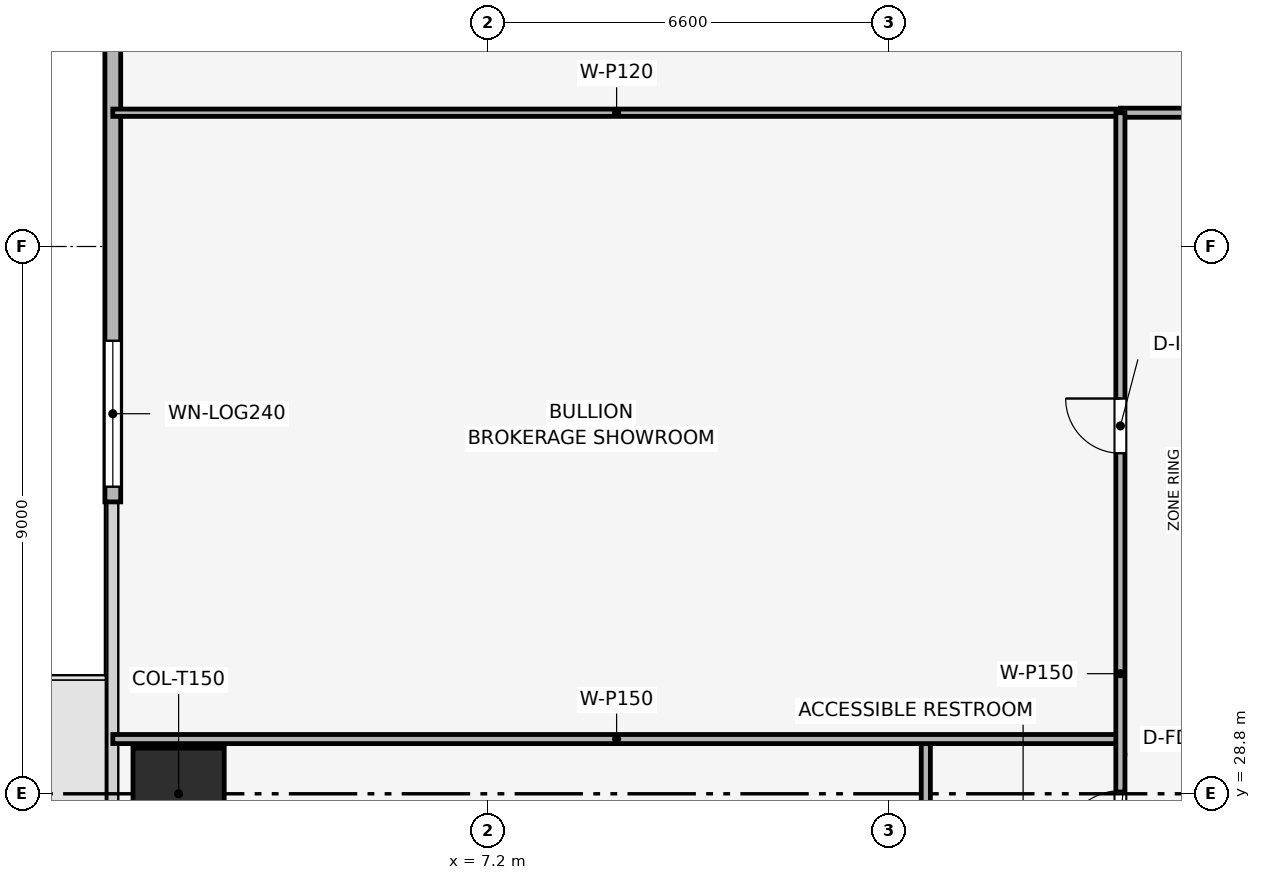
"""IFC4 building model, lengths in metres.
Left out: names, types, materials, properties, quantities, classifications, styles, units other than length and angle.
Written with IfcOpenShell. Run it as: python <this file> out.ifc"""

import sys

from ifc_helpers import new_model, si_unit, direction, frame, frame_2d, origin, origin_2d, place, context, subcontext, project, spatial, rectangle, extrude, element, fill, save


model = new_model("IFC4")
c1 = context("Model", 3, precision=1e-05, world=origin(), true_north=direction((0.0, 1.0)))
c2 = subcontext(c1, "Body", "Model", "MODEL_VIEW")
j1 = project(units=[si_unit("LENGTHUNIT", "METRE"), si_unit("PLANEANGLEUNIT", "RADIAN")], contexts=[c1])
p1 = place(None, origin())
s1 = spatial("IfcSite", under=j1, at=p1, CompositionType="ELEMENT")
p2 = place(p1, origin())
s2 = spatial("IfcBuilding", under=s1, at=p2, CompositionType="ELEMENT")
p3 = place(p2, frame((0.0, 0.0, 104.1)))
s3 = spatial("IfcBuildingStorey", under=s2, at=p3, CompositionType="ELEMENT", Elevation=104.1)
p4 = place(p3, frame((2.112, 28.8, 0.053), z_axis=(0.224854519766, 0.0, 0.974392346512), x_axis=(0.0, 1.0, 0.0)))
e1 = element("IfcColumn", 1, at=p4, inside=s3, PredefinedType="COLUMN", context=c2, shape_type="SweptSolid", body=[
    extrude(rectangle(XDim=1.5, YDim=1.5, at=origin_2d()), origin(), (0.0, 0.0, 1.0), 3.575),
])
p5 = place(p3, frame((1.03, 33.6, 0.0), z_axis=(0.0, 0.0, 1.0), x_axis=(0.0, 1.0, 0.0)))
e2 = element("IfcWall", 2, at=p5, inside=s3, PredefinedType="SOLIDWALL", context=c2, shape_type="SweptSolid", body=[
    extrude(rectangle(XDim=15.3, YDim=0.26, at=frame_2d((7.65, 0.0))), origin(), (0.0, 0.0, 1.0), 3.54),
])
p6 = place(p5, frame((0.25, 0.0, 0.72)))
e3 = element("IfcOpeningElement", 3, at=p6, cuts=e2, PredefinedType="OPENING", context=c2, shape_type="SweptSolid", body=[
    extrude(rectangle(XDim=2.4, YDim=2.1, at=frame_2d((1.2, 1.05))), frame((0.0, 0.14, 0.0), z_axis=(0.0, -1.0, 0.0), x_axis=(1.0, 0.0, 0.0)), (0.0, 0.0, 1.0), 0.28),
])
p7 = place(p3, frame((1.03, 40.0, 0.0), z_axis=(0.0, 0.0, 1.0), x_axis=(1.0, 0.0, 0.0)))
e4 = element("IfcWall", 4, at=p7, inside=s3, PredefinedType="PARTITIONING", context=c2, shape_type="SweptSolid", body=[
    extrude(rectangle(XDim=16.57, YDim=0.12, at=frame_2d((8.285, 0.0))), origin(), (0.0, 0.0, 1.0), 2.825),
])
p8 = place(p3, frame((14.4, 21.3, 0.0), z_axis=(0.0, 0.0, 1.0), x_axis=(0.0, 1.0, 0.0)))
e5 = element("IfcWall", 5, at=p8, inside=s3, PredefinedType="PARTITIONING", context=c2, shape_type="SweptSolid", body=[
    extrude(rectangle(XDim=8.4, YDim=0.15, at=frame_2d((4.2, 0.0))), origin(), (0.0, 0.0, 1.0), 2.975),
])
p9 = place(p3, frame((1.03, 29.7, 0.0), z_axis=(0.0, 0.0, 1.0), x_axis=(1.0, 0.0, 0.0)))
e6 = element("IfcWall", 6, at=p9, inside=s3, PredefinedType="PARTITIONING", context=c2, shape_type="SweptSolid", body=[
    extrude(rectangle(XDim=16.57, YDim=0.15, at=frame_2d((8.285, 0.0))), origin(), (0.0, 0.0, 1.0), 2.825),
])
p10 = place(p3, frame((17.6, 40.0, 0.0), z_axis=(0.0, 0.0, 1.0), x_axis=(1.0, 0.0, 0.0)))
e7 = element("IfcWall", 7, at=p10, inside=s3, PredefinedType="PARTITIONING", context=c2, shape_type="SweptSolid", body=[
    extrude(rectangle(XDim=22.4, YDim=0.15, at=frame_2d((11.2, 0.0))), origin(), (0.0, 0.0, 1.0), 2.975),
])
p11 = place(p10, frame((4.438, 0.0, 0.0)))
e8 = element("IfcOpeningElement", 8, at=p11, cuts=e7, PredefinedType="OPENING", context=c2, shape_type="SweptSolid", body=[
    extrude(rectangle(XDim=0.9, YDim=2.1, at=frame_2d((0.45, 1.05))), frame((0.0, 0.085, 0.0), z_axis=(0.0, -1.0, 0.0), x_axis=(1.0, 0.0, 0.0)), (0.0, 0.0, 1.0), 0.17),
])
p12 = place(p10, frame((15.638, 0.0, 0.0)))
e9 = element("IfcOpeningElement", 9, at=p12, cuts=e7, PredefinedType="OPENING", context=c2, shape_type="SweptSolid", body=[
    extrude(rectangle(XDim=0.9, YDim=2.1, at=frame_2d((0.45, 1.05))), frame((0.0, 0.085, 0.0), z_axis=(0.0, -1.0, 0.0), x_axis=(1.0, 0.0, 0.0)), (0.0, 0.0, 1.0), 0.17),
])
p13 = place(p3, frame((17.6, 17.6, 0.0), z_axis=(0.0, 0.0, 1.0), x_axis=(0.0, 1.0, 0.0)))
e10 = element("IfcWall", 10, at=p13, inside=s3, PredefinedType="PARTITIONING", context=c2, shape_type="SweptSolid", body=[
    extrude(rectangle(XDim=22.4, YDim=0.15, at=frame_2d((11.2, 0.0))), origin(), (0.0, 0.0, 1.0), 2.975),
])
p14 = place(p13, frame((1.4, 0.0, 0.0)))
e11 = element("IfcOpeningElement", 11, at=p14, cuts=e10, PredefinedType="OPENING", context=c2, shape_type="SweptSolid", body=[
    extrude(rectangle(XDim=0.9, YDim=2.1, at=frame_2d((0.45, 1.05))), frame((0.0, 0.085, 0.0), z_axis=(0.0, -1.0, 0.0), x_axis=(1.0, 0.0, 0.0)), (0.0, 0.0, 1.0), 0.17),
])
p15 = place(p13, frame((4.65, 0.0, 0.0)))
e12 = element("IfcOpeningElement", 12, at=p15, cuts=e10, PredefinedType="OPENING", context=c2, shape_type="SweptSolid", body=[
    extrude(rectangle(XDim=0.9, YDim=2.1, at=frame_2d((0.45, 1.05))), frame((0.0, 0.085, 0.0), z_axis=(0.0, -1.0, 0.0), x_axis=(1.0, 0.0, 0.0)), (0.0, 0.0, 1.0), 0.17),
])
p16 = place(p13, frame((7.55, 0.0, 0.0)))
e13 = element("IfcOpeningElement", 13, at=p16, cuts=e10, PredefinedType="OPENING", context=c2, shape_type="SweptSolid", body=[
    extrude(rectangle(XDim=0.9, YDim=2.1, at=frame_2d((0.45, 1.05))), frame((0.0, 0.085, 0.0), z_axis=(0.0, -1.0, 0.0), x_axis=(1.0, 0.0, 0.0)), (0.0, 0.0, 1.0), 0.17),
])
p17 = place(p13, frame((10.3, 0.0, 0.0)))
e14 = element("IfcOpeningElement", 14, at=p17, cuts=e10, PredefinedType="OPENING", context=c2, shape_type="SweptSolid", body=[
    extrude(rectangle(XDim=0.95, YDim=2.1, at=frame_2d((0.475, 1.05))), frame((0.0, 0.085, 0.0), z_axis=(0.0, -1.0, 0.0), x_axis=(1.0, 0.0, 0.0)), (0.0, 0.0, 1.0), 0.17),
])
p18 = place(p13, frame((16.8, 0.0, 0.0)))
e15 = element("IfcOpeningElement", 15, at=p18, cuts=e10, PredefinedType="OPENING", context=c2, shape_type="SweptSolid", body=[
    extrude(rectangle(XDim=0.9, YDim=2.1, at=frame_2d((0.45, 1.05))), frame((0.0, 0.085, 0.0), z_axis=(0.0, -1.0, 0.0), x_axis=(1.0, 0.0, 0.0)), (0.0, 0.0, 1.0), 0.17),
])
p19 = place(p6, origin())
e16 = element("IfcWindow", 16, at=p19, inside=s3, PartitioningType="SINGLE_PANEL", PredefinedType="WINDOW", context=c2, shape_type="SweptSolid", body=[
    extrude(rectangle(XDim=2.4, YDim=2.1, at=frame_2d((1.2, 1.05))), frame((0.0, 0.03, 0.0), z_axis=(0.0, -1.0, 0.0), x_axis=(1.0, 0.0, 0.0)), (0.0, 0.0, 1.0), 0.06),
])
fill(e3, e16)
p20 = place(p17, origin())
e17 = element("IfcDoor", 17, at=p20, inside=s3, OperationType="SINGLE_SWING_LEFT", PredefinedType="DOOR", context=c2, shape_type="SweptSolid", body=[
    extrude(rectangle(XDim=0.95, YDim=2.1, at=frame_2d((0.475, 1.05))), frame((0.0, 0.025, 0.0), z_axis=(0.0, -1.0, 0.0), x_axis=(1.0, 0.0, 0.0)), (0.0, 0.0, 1.0), 0.05),
])
fill(e14, e17)
p21 = place(p18, origin())
e18 = element("IfcDoor", 18, at=p21, inside=s3, OperationType="SINGLE_SWING_RIGHT", PredefinedType="DOOR", context=c2, shape_type="SweptSolid", body=[
    extrude(rectangle(XDim=0.9, YDim=2.1, at=frame_2d((0.45, 1.05))), frame((0.0, 0.025, 0.0), z_axis=(0.0, -1.0, 0.0), x_axis=(1.0, 0.0, 0.0)), (0.0, 0.0, 1.0), 0.05),
])
fill(e15, e18)
save(model, sys.argv[1])
